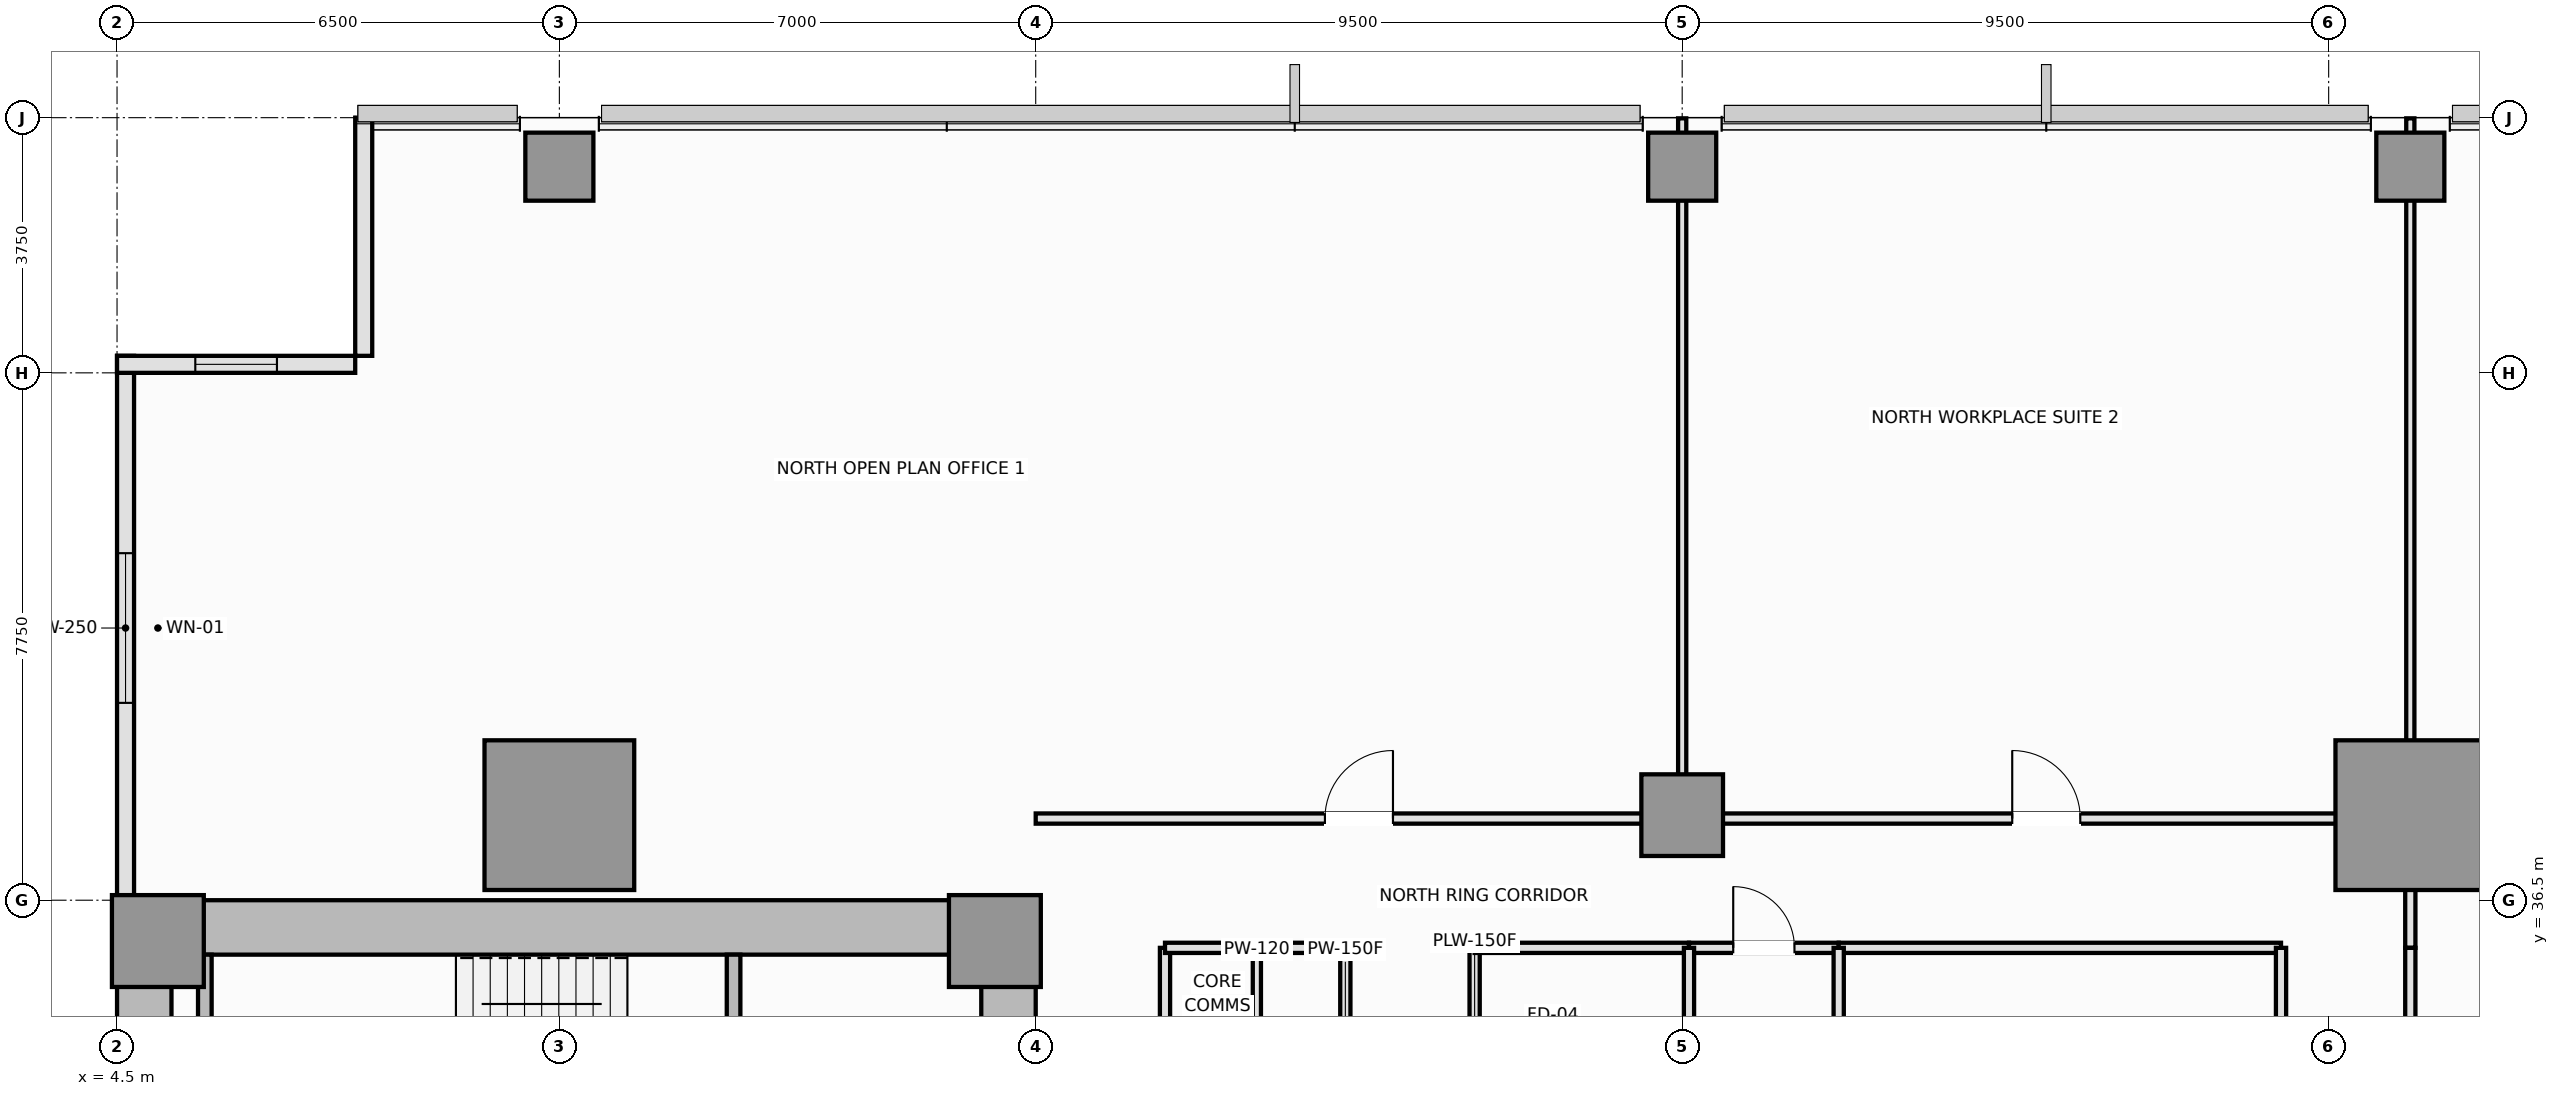
"""IFC4 building model, lengths in metres.
Left out: names, types, materials, properties, quantities, classifications, styles, units other than length and angle.
Written with IfcOpenShell. Run it as: python <this file> out.ifc"""

import sys

from ifc_helpers import new_model, si_unit, direction, frame, frame_2d, origin, origin_2d, place, context, subcontext, project, spatial, rectangle, extrude, element, fill, save


model = new_model("IFC4")
c1 = context("Model", 3, precision=1e-05, world=origin(), true_north=direction((0.0, 1.0)))
c2 = subcontext(c1, "Body", "Model", "MODEL_VIEW")
j1 = project(units=[si_unit("LENGTHUNIT", "METRE"), si_unit("PLANEANGLEUNIT", "RADIAN")], contexts=[c1])
p1 = place(None, origin())
s1 = spatial("IfcSite", under=j1, at=p1, CompositionType="ELEMENT")
p2 = place(p1, origin())
s2 = spatial("IfcBuilding", under=s1, at=p2, CompositionType="ELEMENT")
p3 = place(p2, frame((0.0, 0.0, 32.7)))
s3 = spatial("IfcBuildingStorey", under=s2, at=p3, CompositionType="ELEMENT", Elevation=32.7)
p4 = place(p3, frame((4.5, 36.1, 0.0), z_axis=(0.0, 0.0, 1.0), x_axis=(1.0, 0.0, 0.0)))
e1 = element("IfcWall", 1, at=p4, inside=s3, PredefinedType="SHEAR", context=c2, shape_type="SweptSolid", body=[
    extrude(rectangle(XDim=13.5, YDim=0.8, at=frame_2d((6.75, 0.0))), origin(), (0.0, 0.0, 1.0), 3.55),
])
p5 = place(p3, frame((4.9, 14.8, 0.0), z_axis=(0.0, 0.0, 1.0), x_axis=(0.0, 1.0, 0.0)))
e2 = element("IfcWall", 2, at=p5, inside=s3, PredefinedType="SHEAR", context=c2, shape_type="SweptSolid", body=[
    extrude(rectangle(XDim=20.9, YDim=0.8, at=frame_2d((10.45, 0.0))), origin(), (0.0, 0.0, 1.0), 3.55),
])
p6 = place(p3, frame((17.6, 27.05, 0.0), z_axis=(0.0, 0.0, 1.0), x_axis=(0.0, 1.0, 0.0)))
e3 = element("IfcWall", 3, at=p6, inside=s3, PredefinedType="SHEAR", context=c2, shape_type="SweptSolid", body=[
    extrude(rectangle(XDim=8.65, YDim=0.8, at=frame_2d((4.325, 0.0))), origin(), (0.0, 0.0, 1.0), 3.55),
])
p7 = place(p6, frame((3.45, 0.0, 0.0)))
e4 = element("IfcOpeningElement", 4, at=p7, cuts=e3, PredefinedType="OPENING", context=c2, shape_type="SweptSolid", body=[
    extrude(rectangle(XDim=1.1, YDim=2.15, at=frame_2d((0.55, 1.075))), frame((0.0, 0.41, 0.0), z_axis=(0.0, -1.0, 0.0), x_axis=(1.0, 0.0, 0.0)), (0.0, 0.0, 1.0), 0.82),
])
for number, where, z_axis, x_axis in (
    (5, (5.1, 35.9, 0.0), (0.0, 0.0, 1.0), (1.0, 0.0, 0.0)),
    (6, (17.4, 35.9, 0.0), (0.0, 0.0, 1.0), (1.0, 0.0, 0.0)),
):
    element("IfcColumn", number, at=place(p3, frame(where, z_axis=z_axis, x_axis=x_axis)), inside=s3, PredefinedType="PILASTER", context=c2, shape_type="SweptSolid", body=[
        extrude(rectangle(XDim=1.35, YDim=1.35, at=origin_2d()), origin(), (0.0, 0.0, 1.0), 3.55),
    ])
for number, where, z_axis, x_axis in (
    (7, (11.0, 37.75, 0.0), (0.0, 0.0, 1.0), (1.0, 0.0, 0.0)),
    (8, (38.2, 37.75, 0.0), (0.0, 0.0, 1.0), (1.0, 0.0, 0.0)),
):
    element("IfcColumn", number, at=place(p3, frame(where, z_axis=z_axis, x_axis=x_axis)), inside=s3, PredefinedType="COLUMN", context=c2, shape_type="SweptSolid", body=[
        extrude(rectangle(XDim=2.2, YDim=2.2, at=origin_2d()), origin(), (0.0, 0.0, 1.0), 3.55),
    ])
p8 = place(p3, frame((27.5, 37.75, 0.0), z_axis=(0.0, 0.0, 1.0), x_axis=(1.0, 0.0, 0.0)))
e9 = element("IfcColumn", 9, at=p8, inside=s3, PredefinedType="COLUMN", context=c2, shape_type="SweptSolid", body=[
    extrude(rectangle(XDim=1.2, YDim=1.2, at=origin_2d()), origin(), (0.0, 0.0, 1.0), 3.55),
])
for number, where, z_axis, x_axis in (
    (10, (11.0, 47.28, 0.0), (0.0, 0.0, 1.0), (1.0, 0.0, 0.0)),
    (11, (27.5, 47.28, 0.0), (0.0, 0.0, 1.0), (1.0, 0.0, 0.0)),
    (12, (38.2, 47.28, 0.0), (0.0, 0.0, 1.0), (1.0, 0.0, 0.0)),
):
    element("IfcColumn", number, at=place(p3, frame(where, z_axis=z_axis, x_axis=x_axis)), inside=s3, PredefinedType="COLUMN", context=c2, shape_type="SweptSolid", body=[
        extrude(rectangle(XDim=1.0, YDim=1.0, at=origin_2d()), origin(), (0.0, 0.0, 1.0), 3.55),
    ])
p9 = place(p3, frame((4.625, 44.5, 0.0), z_axis=(0.0, 0.0, 1.0), x_axis=(0.0, -1.0, 0.0)))
e13 = element("IfcWall", 13, at=p9, inside=s3, PredefinedType="SOLIDWALL", context=c2, shape_type="SweptSolid", body=[
    extrude(rectangle(XDim=8.0, YDim=0.25, at=frame_2d((4.0, 0.0))), origin(), (0.0, 0.0, 1.0), 3.37),
])
p10 = place(p9, frame((2.9, 0.0, 0.9)))
e14 = element("IfcOpeningElement", 14, at=p10, cuts=e13, PredefinedType="OPENING", context=c2, shape_type="SweptSolid", body=[
    extrude(rectangle(XDim=2.2, YDim=1.8, at=frame_2d((1.1, 0.9))), frame((0.0, 0.135, 0.0), z_axis=(0.0, -1.0, 0.0), x_axis=(1.0, 0.0, 0.0)), (0.0, 0.0, 1.0), 0.27),
])
p11 = place(p3, frame((8.125, 48.0, 0.0), z_axis=(0.0, 0.0, 1.0), x_axis=(0.0, -1.0, 0.0)))
e15 = element("IfcWall", 15, at=p11, inside=s3, PredefinedType="SOLIDWALL", context=c2, shape_type="SweptSolid", body=[
    extrude(rectangle(XDim=3.5, YDim=0.25, at=frame_2d((1.75, 0.0))), origin(), (0.0, 0.0, 1.0), 3.37),
])
p12 = place(p3, frame((8.0, 44.375, 0.0), z_axis=(0.0, 0.0, 1.0), x_axis=(-1.0, 0.0, 0.0)))
e16 = element("IfcWall", 16, at=p12, inside=s3, PredefinedType="SOLIDWALL", context=c2, shape_type="SweptSolid", body=[
    extrude(rectangle(XDim=3.5, YDim=0.25, at=frame_2d((1.75, 0.0))), origin(), (0.0, 0.0, 1.0), 3.37),
])
p13 = place(p12, frame((1.15, 0.0, 0.9)))
e17 = element("IfcOpeningElement", 17, at=p13, cuts=e16, PredefinedType="OPENING", context=c2, shape_type="SweptSolid", body=[
    extrude(rectangle(XDim=1.2, YDim=1.8, at=frame_2d((0.6, 0.9))), frame((0.0, 0.135, 0.0), z_axis=(0.0, -1.0, 0.0), x_axis=(1.0, 0.0, 0.0)), (0.0, 0.0, 1.0), 0.27),
])
p14 = place(p3, frame((5.79, 32.65, 0.0), z_axis=(0.0, 0.0, 1.0), x_axis=(0.0, 1.0, 0.0)))
e18 = element("IfcWall", 18, at=p14, inside=s3, PredefinedType="SOLIDWALL", context=c2, shape_type="SweptSolid", body=[
    extrude(rectangle(XDim=3.05, YDim=0.2, at=frame_2d((1.525, 0.0))), origin(), (0.0, 0.0, 1.0), 3.55),
])
p15 = place(p3, frame((13.56, 32.65, 0.0), z_axis=(0.0, 0.0, 1.0), x_axis=(0.0, 1.0, 0.0)))
e19 = element("IfcWall", 19, at=p15, inside=s3, PredefinedType="SOLIDWALL", context=c2, shape_type="SweptSolid", body=[
    extrude(rectangle(XDim=3.05, YDim=0.2, at=frame_2d((1.525, 0.0))), origin(), (0.0, 0.0, 1.0), 3.55),
])
p16 = place(p15, frame((0.95, 0.0, 0.0)))
e20 = element("IfcOpeningElement", 20, at=p16, cuts=e19, PredefinedType="OPENING", context=c2, shape_type="SweptSolid", body=[
    extrude(rectangle(XDim=1.15, YDim=2.15, at=frame_2d((0.575, 1.075))), frame((0.0, 0.11, 0.0), z_axis=(0.0, -1.0, 0.0), x_axis=(1.0, 0.0, 0.0)), (0.0, 0.0, 1.0), 0.22),
])
p17 = place(p3, frame((22.55, 29.75, 0.0), z_axis=(0.0, 0.0, 1.0), x_axis=(0.0, 1.0, 0.0)))
e21 = element("IfcWall", 21, at=p17, inside=s3, PredefinedType="PARTITIONING", context=c2, shape_type="SweptSolid", body=[
    extrude(rectangle(XDim=6.05, YDim=0.15, at=frame_2d((3.025, 0.0))), origin(), (0.0, 0.0, 1.0), 3.01),
])
p18 = place(p17, frame((2.525, 0.0, 0.0)))
e22 = element("IfcOpeningElement", 22, at=p18, cuts=e21, PredefinedType="OPENING", context=c2, shape_type="SweptSolid", body=[
    extrude(rectangle(XDim=1.0, YDim=2.15, at=frame_2d((0.5, 1.075))), frame((0.0, 0.085, 0.0), z_axis=(0.0, -1.0, 0.0), x_axis=(1.0, 0.0, 0.0)), (0.0, 0.0, 1.0), 0.17),
])
p19 = place(p3, frame((24.45, 32.7, 0.0), z_axis=(0.0, 0.0, 1.0), x_axis=(0.0, 1.0, 0.0)))
e23 = element("IfcWall", 23, at=p19, inside=s3, PredefinedType="PLUMBINGWALL", context=c2, shape_type="SweptSolid", body=[
    extrude(rectangle(XDim=3.1, YDim=0.15, at=frame_2d((1.55, 0.0))), origin(), (0.0, 0.0, 1.0), 3.37),
])
p20 = place(p19, frame((1.1, 0.0, 0.0)))
e24 = element("IfcOpeningElement", 24, at=p20, cuts=e23, PredefinedType="OPENING", context=c2, shape_type="SweptSolid", body=[
    extrude(rectangle(XDim=0.9, YDim=2.1, at=frame_2d((0.45, 1.05))), frame((0.0, 0.085, 0.0), z_axis=(0.0, -1.0, 0.0), x_axis=(1.0, 0.0, 0.0)), (0.0, 0.0, 1.0), 0.17),
])
p21 = place(p3, frame((19.9, 29.75, 0.0), z_axis=(0.0, 0.0, 1.0), x_axis=(0.0, 1.0, 0.0)))
e25 = element("IfcWall", 25, at=p21, inside=s3, PredefinedType="PARTITIONING", context=c2, shape_type="SweptSolid", body=[
    extrude(rectangle(XDim=6.05, YDim=0.15, at=frame_2d((3.025, 0.0))), origin(), (0.0, 0.0, 1.0), 3.37),
])
p22 = place(p21, frame((2.525, 0.0, 0.0)))
e26 = element("IfcOpeningElement", 26, at=p22, cuts=e25, PredefinedType="OPENING", context=c2, shape_type="SweptSolid", body=[
    extrude(rectangle(XDim=1.0, YDim=2.15, at=frame_2d((0.5, 1.075))), frame((0.0, 0.085, 0.0), z_axis=(0.0, -1.0, 0.0), x_axis=(1.0, 0.0, 0.0)), (0.0, 0.0, 1.0), 0.17),
])
p23 = place(p3, frame((19.9, 35.8, 0.0), z_axis=(0.0, 0.0, 1.0), x_axis=(1.0, 0.0, 0.0)))
e27 = element("IfcWall", 27, at=p23, inside=s3, PredefinedType="PARTITIONING", context=c2, shape_type="SweptSolid", body=[
    extrude(rectangle(XDim=1.35, YDim=0.15, at=frame_2d((0.675, 0.0))), origin(), (0.0, 0.0, 1.0), 3.37),
])
p24 = place(p3, frame((21.25, 35.8, 0.0), z_axis=(0.0, 0.0, 1.0), x_axis=(1.0, 0.0, 0.0)))
e28 = element("IfcWall", 28, at=p24, inside=s3, PredefinedType="PARTITIONING", context=c2, shape_type="SweptSolid", body=[
    extrude(rectangle(XDim=1.3, YDim=0.15, at=frame_2d((0.65, 0.0))), origin(), (0.0, 0.0, 1.0), 3.37),
])
p25 = place(p3, frame((24.45, 35.8, 0.0), z_axis=(0.0, 0.0, 1.0), x_axis=(1.0, 0.0, 0.0)))
e29 = element("IfcWall", 29, at=p25, inside=s3, PredefinedType="PLUMBINGWALL", context=c2, shape_type="SweptSolid", body=[
    extrude(rectangle(XDim=3.15, YDim=0.15, at=frame_2d((1.575, 0.0))), origin(), (0.0, 0.0, 1.0), 3.37),
])
p26 = place(p3, frame((27.6, 35.8, 0.0), z_axis=(0.0, 0.0, 1.0), x_axis=(1.0, 0.0, 0.0)))
e30 = element("IfcWall", 30, at=p26, inside=s3, PredefinedType="PLUMBINGWALL", context=c2, shape_type="SweptSolid", body=[
    extrude(rectangle(XDim=2.2, YDim=0.15, at=frame_2d((1.1, 0.0))), origin(), (0.0, 0.0, 1.0), 3.37),
])
p27 = place(p26, frame((0.65, 0.0, 0.0)))
e31 = element("IfcOpeningElement", 31, at=p27, cuts=e30, PredefinedType="OPENING", context=c2, shape_type="SweptSolid", body=[
    extrude(rectangle(XDim=0.9, YDim=2.1, at=frame_2d((0.45, 1.05))), frame((0.0, 0.085, 0.0), z_axis=(0.0, -1.0, 0.0), x_axis=(1.0, 0.0, 0.0)), (0.0, 0.0, 1.0), 0.17),
])
p28 = place(p3, frame((29.8, 35.8, 0.0), z_axis=(0.0, 0.0, 1.0), x_axis=(1.0, 0.0, 0.0)))
e32 = element("IfcWall", 32, at=p28, inside=s3, PredefinedType="PARTITIONING", context=c2, shape_type="SweptSolid", body=[
    extrude(rectangle(XDim=6.5, YDim=0.15, at=frame_2d((3.25, 0.0))), origin(), (0.0, 0.0, 1.0), 3.37),
])
p29 = place(p3, frame((18.0, 37.7, 0.0), z_axis=(0.0, 0.0, 1.0), x_axis=(1.0, 0.0, 0.0)))
e33 = element("IfcWall", 33, at=p29, inside=s3, PredefinedType="PARTITIONING", context=c2, shape_type="SweptSolid", body=[
    extrude(rectangle(XDim=9.5, YDim=0.15, at=frame_2d((4.75, 0.0))), origin(), (0.0, 0.0, 1.0), 2.72),
])
p30 = place(p29, frame((4.25, 0.0, 0.0)))
e34 = element("IfcOpeningElement", 34, at=p30, cuts=e33, PredefinedType="OPENING", context=c2, shape_type="SweptSolid", body=[
    extrude(rectangle(XDim=1.0, YDim=2.15, at=frame_2d((0.5, 1.075))), frame((0.0, 0.085, 0.0), z_axis=(0.0, -1.0, 0.0), x_axis=(1.0, 0.0, 0.0)), (0.0, 0.0, 1.0), 0.17),
])
p31 = place(p3, frame((27.5, 37.7, 0.0), z_axis=(0.0, 0.0, 1.0), x_axis=(1.0, 0.0, 0.0)))
e35 = element("IfcWall", 35, at=p31, inside=s3, PredefinedType="PARTITIONING", context=c2, shape_type="SweptSolid", body=[
    extrude(rectangle(XDim=10.7, YDim=0.15, at=frame_2d((5.35, 0.0))), origin(), (0.0, 0.0, 1.0), 2.72),
])
p32 = place(p31, frame((4.85, 0.0, 0.0)))
e36 = element("IfcOpeningElement", 36, at=p32, cuts=e35, PredefinedType="OPENING", context=c2, shape_type="SweptSolid", body=[
    extrude(rectangle(XDim=1.0, YDim=2.15, at=frame_2d((0.5, 1.075))), frame((0.0, 0.085, 0.0), z_axis=(0.0, -1.0, 0.0), x_axis=(1.0, 0.0, 0.0)), (0.0, 0.0, 1.0), 0.17),
])
p33 = place(p3, frame((38.2, 35.8, 0.0), z_axis=(0.0, 0.0, 1.0), x_axis=(0.0, 1.0, 0.0)))
e37 = element("IfcWall", 37, at=p33, inside=s3, PredefinedType="PARTITIONING", context=c2, shape_type="SweptSolid", body=[
    extrude(rectangle(XDim=1.9, YDim=0.15, at=frame_2d((0.95, 0.0))), origin(), (0.0, 0.0, 1.0), 2.82),
])
p34 = place(p3, frame((36.3, 32.7, 0.0), z_axis=(0.0, 0.0, 1.0), x_axis=(0.0, 1.0, 0.0)))
e38 = element("IfcWall", 38, at=p34, inside=s3, PredefinedType="PARTITIONING", context=c2, shape_type="SweptSolid", body=[
    extrude(rectangle(XDim=3.1, YDim=0.15, at=frame_2d((1.55, 0.0))), origin(), (0.0, 0.0, 1.0), 3.37),
])
p35 = place(p34, frame((1.05, 0.0, 0.0)))
e39 = element("IfcOpeningElement", 39, at=p35, cuts=e38, PredefinedType="OPENING", context=c2, shape_type="SweptSolid", body=[
    extrude(rectangle(XDim=1.0, YDim=2.15, at=frame_2d((0.5, 1.075))), frame((0.0, 0.085, 0.0), z_axis=(0.0, -1.0, 0.0), x_axis=(1.0, 0.0, 0.0)), (0.0, 0.0, 1.0), 0.17),
])
p36 = place(p3, frame((38.2, 32.0, 0.0), z_axis=(0.0, 0.0, 1.0), x_axis=(0.0, 1.0, 0.0)))
e40 = element("IfcWall", 40, at=p36, inside=s3, PredefinedType="PARTITIONING", context=c2, shape_type="SweptSolid", body=[
    extrude(rectangle(XDim=3.8, YDim=0.15, at=frame_2d((1.9, 0.0))), origin(), (0.0, 0.0, 1.0), 2.82),
])
p37 = place(p36, frame((1.4, 0.0, 0.0)))
e41 = element("IfcOpeningElement", 41, at=p37, cuts=e40, PredefinedType="OPENING", context=c2, shape_type="SweptSolid", body=[
    extrude(rectangle(XDim=1.0, YDim=2.15, at=frame_2d((0.5, 1.075))), frame((0.0, 0.085, 0.0), z_axis=(0.0, -1.0, 0.0), x_axis=(1.0, 0.0, 0.0)), (0.0, 0.0, 1.0), 0.17),
])
p38 = place(p3, frame((21.25, 29.75, 0.0), z_axis=(0.0, 0.0, 1.0), x_axis=(0.0, 1.0, 0.0)))
e42 = element("IfcWall", 42, at=p38, inside=s3, PredefinedType="PARTITIONING", context=c2, shape_type="SweptSolid", body=[
    extrude(rectangle(XDim=6.05, YDim=0.12, at=frame_2d((3.025, 0.0))), origin(), (0.0, 0.0, 1.0), 3.37),
])
for number, where, z_axis, x_axis in (
    (43, (27.6, 32.7, 0.0), (0.0, 0.0, 1.0), (0.0, 1.0, 0.0)),
    (44, (29.8, 32.7, 0.0), (0.0, 0.0, 1.0), (0.0, 1.0, 0.0)),
):
    element("IfcWall", number, at=place(p3, frame(where, z_axis=z_axis, x_axis=x_axis)), inside=s3, PredefinedType="PLUMBINGWALL", context=c2, shape_type="SweptSolid", body=[
        extrude(rectangle(XDim=3.1, YDim=0.15, at=frame_2d((1.55, 0.0))), origin(), (0.0, 0.0, 1.0), 3.37),
    ])
for number, where, z_axis, x_axis in (
    (45, (27.5, 37.7, 0.0), (0.0, 0.0, 1.0), (0.0, 1.0, 0.0)),
    (46, (38.2, 37.7, 0.0), (0.0, 0.0, 1.0), (0.0, 1.0, 0.0)),
):
    element("IfcWall", number, at=place(p3, frame(where, z_axis=z_axis, x_axis=x_axis)), inside=s3, PredefinedType="PARTITIONING", context=c2, shape_type="SweptSolid", body=[
        extrude(rectangle(XDim=10.29, YDim=0.12, at=frame_2d((5.145, 0.0))), origin(), (0.0, 0.0, 1.0), 2.82),
    ])
p39 = place(p10, origin())
e47 = element("IfcWindow", 47, at=p39, inside=s3, PartitioningType="SINGLE_PANEL", PredefinedType="WINDOW", context=c2, shape_type="SweptSolid", body=[
    extrude(rectangle(XDim=2.2, YDim=1.8, at=frame_2d((1.1, 0.9))), frame((0.0, 0.03, 0.0), z_axis=(0.0, -1.0, 0.0), x_axis=(1.0, 0.0, 0.0)), (0.0, 0.0, 1.0), 0.06),
])
fill(e14, e47)
p40 = place(p13, origin())
e48 = element("IfcWindow", 48, at=p40, inside=s3, PartitioningType="SINGLE_PANEL", PredefinedType="WINDOW", context=c2, shape_type="SweptSolid", body=[
    extrude(rectangle(XDim=1.2, YDim=1.8, at=frame_2d((0.6, 0.9))), frame((0.0, 0.03, 0.0), z_axis=(0.0, -1.0, 0.0), x_axis=(1.0, 0.0, 0.0)), (0.0, 0.0, 1.0), 0.06),
])
fill(e17, e48)
p41 = place(p27, origin())
e49 = element("IfcDoor", 49, at=p41, inside=s3, OperationType="SINGLE_SWING_LEFT", PredefinedType="DOOR", context=c2, shape_type="SweptSolid", body=[
    extrude(rectangle(XDim=0.9, YDim=2.1, at=frame_2d((0.45, 1.05))), frame((0.0, 0.025, 0.0), z_axis=(0.0, -1.0, 0.0), x_axis=(1.0, 0.0, 0.0)), (0.0, 0.0, 1.0), 0.05),
])
fill(e31, e49)
p42 = place(p30, origin())
e50 = element("IfcDoor", 50, at=p42, inside=s3, OperationType="SINGLE_SWING_RIGHT", PredefinedType="DOOR", context=c2, shape_type="SweptSolid", body=[
    extrude(rectangle(XDim=1.0, YDim=2.15, at=frame_2d((0.5, 1.075))), frame((0.0, 0.025, 0.0), z_axis=(0.0, -1.0, 0.0), x_axis=(1.0, 0.0, 0.0)), (0.0, 0.0, 1.0), 0.05),
])
fill(e34, e50)
p43 = place(p32, origin())
e51 = element("IfcDoor", 51, at=p43, inside=s3, OperationType="SINGLE_SWING_LEFT", PredefinedType="DOOR", context=c2, shape_type="SweptSolid", body=[
    extrude(rectangle(XDim=1.0, YDim=2.15, at=frame_2d((0.5, 1.075))), frame((0.0, 0.025, 0.0), z_axis=(0.0, -1.0, 0.0), x_axis=(1.0, 0.0, 0.0)), (0.0, 0.0, 1.0), 0.05),
])
fill(e36, e51)
save(model, sys.argv[1])
